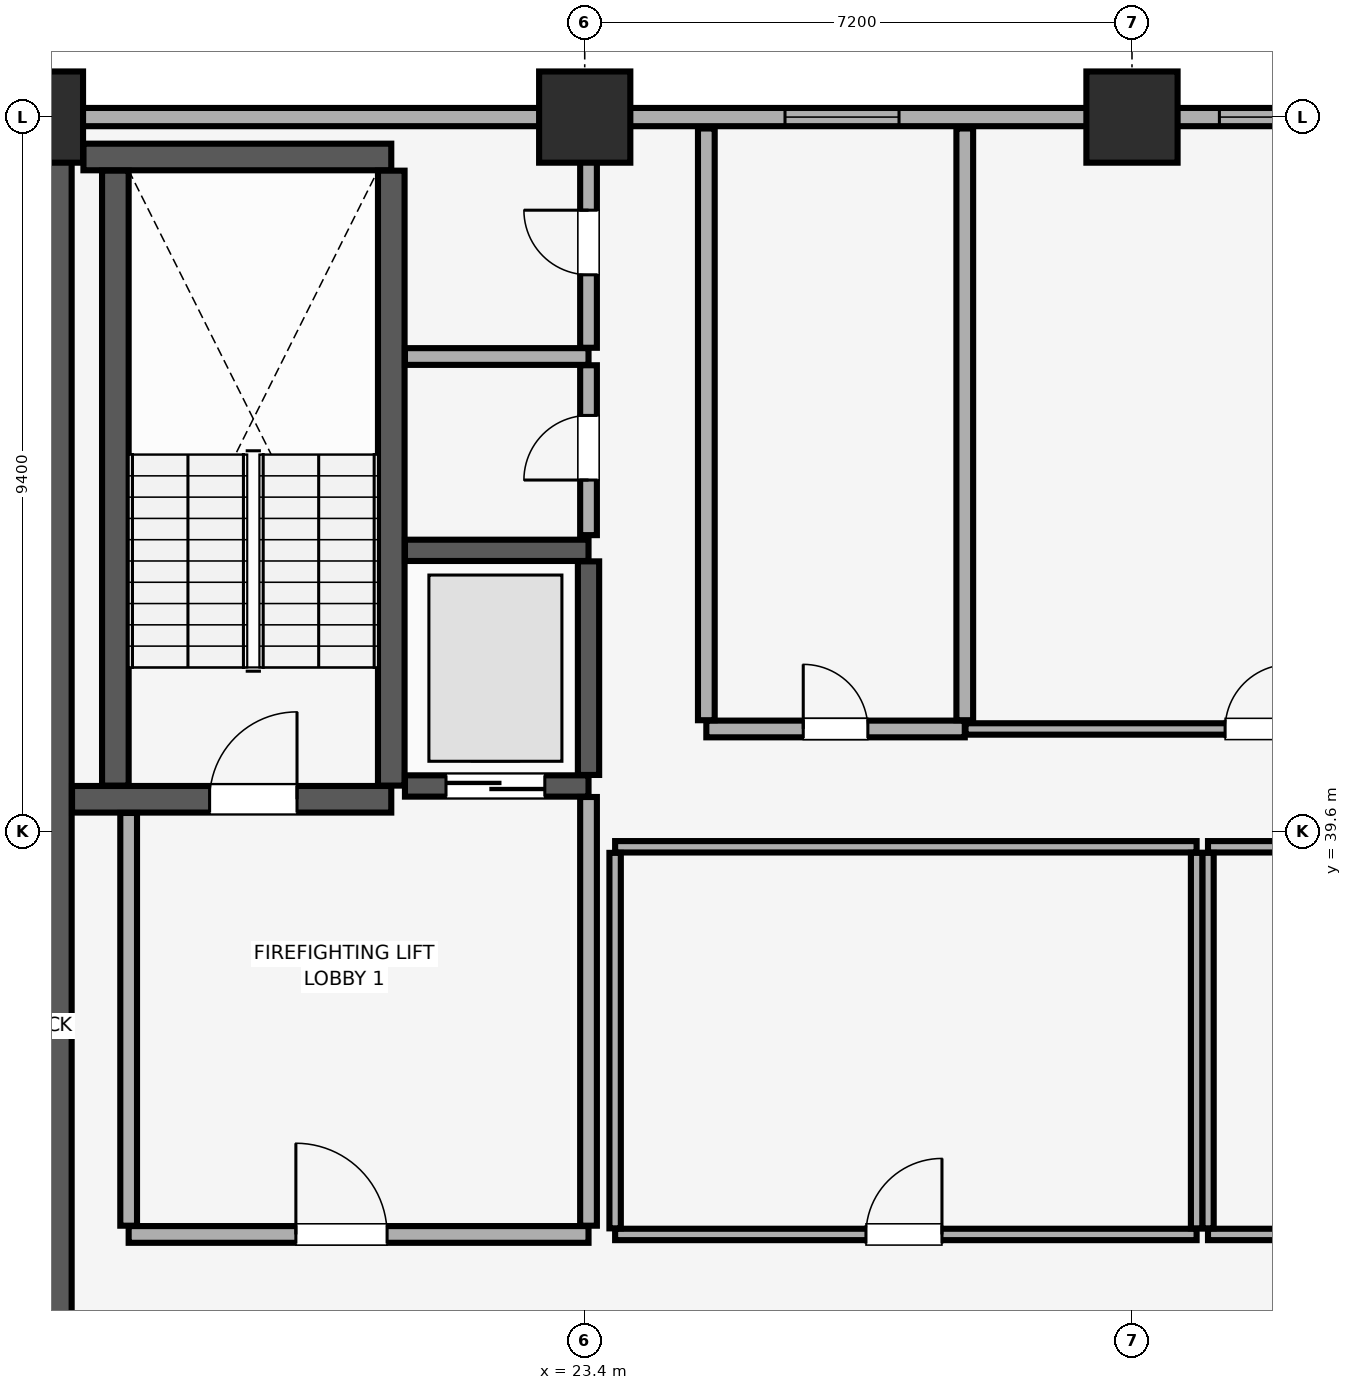
"""IFC4 building model, lengths in metres.
Left out: names, types, materials, properties, quantities, classifications, styles, units other than length and angle.
Written with IfcOpenShell. Run it as: python <this file> out.ifc"""

import sys

from ifc_helpers import new_model, si_unit, direction, frame, frame_2d, origin, origin_2d, place, context, subcontext, project, spatial, rectangle, extrude, element, fill, save


model = new_model("IFC4")
c1 = context("Model", 3, precision=1e-05, world=origin(), true_north=direction((0.0, 1.0)))
c2 = subcontext(c1, "Body", "Model", "MODEL_VIEW")
j1 = project(units=[si_unit("LENGTHUNIT", "METRE"), si_unit("PLANEANGLEUNIT", "RADIAN")], contexts=[c1])
p1 = place(None, origin())
s1 = spatial("IfcSite", under=j1, at=p1, CompositionType="ELEMENT")
p2 = place(p1, origin())
s2 = spatial("IfcBuilding", under=s1, at=p2, CompositionType="ELEMENT")
p3 = place(p2, frame((0.0, 0.0, 220.55)))
s3 = spatial("IfcBuildingStorey", under=s2, at=p3, CompositionType="ELEMENT", Elevation=220.55)
for number, where, z_axis, x_axis in (
    (1, (16.2, 49.0, 0.0), (0.0, 0.0, 1.0), (1.0, 0.0, 0.0)),
    (2, (23.4, 49.0, 0.0), (0.0, 0.0, 1.0), (1.0, 0.0, 0.0)),
    (3, (30.6, 49.0, 0.0), (0.0, 0.0, 1.0), (1.0, 0.0, 0.0)),
):
    element("IfcColumn", number, at=place(p3, frame(where, z_axis=z_axis, x_axis=x_axis)), inside=s3, PredefinedType="COLUMN", context=c2, shape_type="SweptSolid", body=[
        extrude(rectangle(XDim=1.2, YDim=1.2, at=origin_2d()), origin(), (0.0, 0.0, 1.0), 3.56),
    ])
p4 = place(p3, frame((77.0, 49.0, 0.0), z_axis=(0.0, 0.0, 1.0), x_axis=(-1.0, 0.0, 0.0)))
e4 = element("IfcWall", 4, at=p4, inside=s3, PredefinedType="SOLIDWALL", context=c2, shape_type="SweptSolid", body=[
    extrude(rectangle(XDim=70.0, YDim=0.24, at=frame_2d((35.0, 0.0))), origin(), (0.0, 0.0, 1.0), 2.76),
])
p5 = place(p4, frame((63.7, 0.0, 0.85)))
e5 = element("IfcOpeningElement", 5, at=p5, cuts=e4, PredefinedType="OPENING", context=c2, shape_type="SweptSolid", body=[
    extrude(rectangle(XDim=3.0, YDim=1.5, at=frame_2d((1.5, 0.75))), frame((0.0, 0.13, 0.0), z_axis=(0.0, -1.0, 0.0), x_axis=(1.0, 0.0, 0.0)), (0.0, 0.0, 1.0), 0.26),
])
p6 = place(p4, frame((3.3, 0.0, 0.85)))
e6 = element("IfcOpeningElement", 6, at=p6, cuts=e4, PredefinedType="OPENING", context=c2, shape_type="SweptSolid", body=[
    extrude(rectangle(XDim=3.0, YDim=1.5, at=frame_2d((1.5, 0.75))), frame((0.0, 0.13, 0.0), z_axis=(0.0, -1.0, 0.0), x_axis=(1.0, 0.0, 0.0)), (0.0, 0.0, 1.0), 0.26),
])
p7 = place(p4, frame((49.465, 0.0, 0.9)))
e7 = element("IfcOpeningElement", 7, at=p7, cuts=e4, PredefinedType="OPENING", context=c2, shape_type="SweptSolid", body=[
    extrude(rectangle(XDim=1.5, YDim=1.4, at=frame_2d((0.75, 0.7))), frame((0.0, 0.13, 0.0), z_axis=(0.0, -1.0, 0.0), x_axis=(1.0, 0.0, 0.0)), (0.0, 0.0, 1.0), 0.26),
])
p8 = place(p4, frame((41.65, 0.0, 0.9)))
e8 = element("IfcOpeningElement", 8, at=p8, cuts=e4, PredefinedType="OPENING", context=c2, shape_type="SweptSolid", body=[
    extrude(rectangle(XDim=3.6, YDim=1.5, at=frame_2d((1.8, 0.75))), frame((0.0, 0.13, 0.0), z_axis=(0.0, -1.0, 0.0), x_axis=(1.0, 0.0, 0.0)), (0.0, 0.0, 1.0), 0.26),
])
p9 = place(p4, frame((28.25, 0.0, 0.9)))
e9 = element("IfcOpeningElement", 9, at=p9, cuts=e4, PredefinedType="OPENING", context=c2, shape_type="SweptSolid", body=[
    extrude(rectangle(XDim=1.5, YDim=1.4, at=frame_2d((0.75, 0.7))), frame((0.0, 0.13, 0.0), z_axis=(0.0, -1.0, 0.0), x_axis=(1.0, 0.0, 0.0)), (0.0, 0.0, 1.0), 0.26),
])
p10 = place(p4, frame((24.6, 0.0, 0.9)))
e10 = element("IfcOpeningElement", 10, at=p10, cuts=e4, PredefinedType="OPENING", context=c2, shape_type="SweptSolid", body=[
    extrude(rectangle(XDim=2.4, YDim=1.5, at=frame_2d((1.2, 0.75))), frame((0.0, 0.13, 0.0), z_axis=(0.0, -1.0, 0.0), x_axis=(1.0, 0.0, 0.0)), (0.0, 0.0, 1.0), 0.26),
])
p11 = place(p4, frame((20.235, 0.0, 0.9)))
e11 = element("IfcOpeningElement", 11, at=p11, cuts=e4, PredefinedType="OPENING", context=c2, shape_type="SweptSolid", body=[
    extrude(rectangle(XDim=2.4, YDim=1.5, at=frame_2d((1.2, 0.75))), frame((0.0, 0.13, 0.0), z_axis=(0.0, -1.0, 0.0), x_axis=(1.0, 0.0, 0.0)), (0.0, 0.0, 1.0), 0.26),
])
p12 = place(p3, frame((16.2, 29.4, 0.0), z_axis=(0.0, 0.0, 1.0), x_axis=(0.0, 1.0, 0.0)))
e12 = element("IfcWall", 12, at=p12, inside=s3, PredefinedType="SHEAR", context=c2, shape_type="SweptSolid", body=[
    extrude(rectangle(XDim=19.2, YDim=0.9, at=frame_2d((9.6, 0.0))), origin(), (0.0, 0.0, 1.0), 3.56),
])
p13 = place(p3, frame((16.655, 40.025, 0.0), z_axis=(0.0, 0.0, 1.0), x_axis=(1.0, 0.0, 0.0)))
e13 = element("IfcWall", 13, at=p13, inside=s3, PredefinedType="SHEAR", context=c2, shape_type="SweptSolid", body=[
    extrude(rectangle(XDim=4.2, YDim=0.35, at=frame_2d((2.1, 0.0))), origin(), (0.0, 0.0, 1.0), 3.56),
])
p14 = place(p13, frame((1.81, 0.0, 0.0)))
e14 = element("IfcOpeningElement", 14, at=p14, cuts=e13, PredefinedType="OPENING", context=c2, shape_type="SweptSolid", body=[
    extrude(rectangle(XDim=1.15, YDim=2.15, at=frame_2d((0.575, 1.075))), frame((0.0, 0.185, 0.0), z_axis=(0.0, -1.0, 0.0), x_axis=(1.0, 0.0, 0.0)), (0.0, 0.0, 1.0), 0.37),
])
p15 = place(p3, frame((16.805, 48.475, 0.0), z_axis=(0.0, 0.0, 1.0), x_axis=(1.0, 0.0, 0.0)))
e15 = element("IfcWall", 15, at=p15, inside=s3, PredefinedType="SHEAR", context=c2, shape_type="SweptSolid", body=[
    extrude(rectangle(XDim=4.05, YDim=0.35, at=frame_2d((2.025, 0.0))), origin(), (0.0, 0.0, 1.0), 3.56),
])
for number, where, z_axis, x_axis in (
    (16, (17.225, 40.205, 0.0), (0.0, 0.0, 1.0), (0.0, 1.0, 0.0)),
    (17, (20.855, 40.205, 0.0), (0.0, 0.0, 1.0), (0.0, 1.0, 0.0)),
):
    element("IfcWall", number, at=place(p3, frame(where, z_axis=z_axis, x_axis=x_axis)), inside=s3, PredefinedType="SHEAR", context=c2, shape_type="SweptSolid", body=[
        extrude(rectangle(XDim=8.09, YDim=0.35, at=frame_2d((4.045, 0.0))), origin(), (0.0, 0.0, 1.0), 3.56),
    ])
p16 = place(p3, frame((21.035, 40.2, 0.0), z_axis=(0.0, 0.0, 1.0), x_axis=(1.0, 0.0, 0.0)))
e18 = element("IfcWall", 18, at=p16, inside=s3, PredefinedType="SHEAR", context=c2, shape_type="SweptSolid", body=[
    extrude(rectangle(XDim=2.415, YDim=0.28, at=frame_2d((1.208, 0.0))), origin(), (0.0, 0.0, 1.0), 3.56),
])
p17 = place(p16, frame((0.54, 0.0, 0.0)))
e19 = element("IfcOpeningElement", 19, at=p17, cuts=e18, PredefinedType="OPENING", context=c2, shape_type="SweptSolid", body=[
    extrude(rectangle(XDim=1.3, YDim=2.3, at=frame_2d((0.65, 1.15))), frame((0.0, 0.15, 0.0), z_axis=(0.0, -1.0, 0.0), x_axis=(1.0, 0.0, 0.0)), (0.0, 0.0, 1.0), 0.3),
])
p18 = place(p3, frame((21.035, 43.3, 0.0), z_axis=(0.0, 0.0, 1.0), x_axis=(1.0, 0.0, 0.0)))
e20 = element("IfcWall", 20, at=p18, inside=s3, PredefinedType="SHEAR", context=c2, shape_type="SweptSolid", body=[
    extrude(rectangle(XDim=2.415, YDim=0.28, at=frame_2d((1.208, 0.0))), origin(), (0.0, 0.0, 1.0), 3.56),
])
p19 = place(p3, frame((23.45, 40.345, 0.0), z_axis=(0.0, 0.0, 1.0), x_axis=(0.0, 1.0, 0.0)))
e21 = element("IfcWall", 21, at=p19, inside=s3, PredefinedType="SHEAR", context=c2, shape_type="SweptSolid", body=[
    extrude(rectangle(XDim=2.81, YDim=0.28, at=frame_2d((1.405, 0.0))), origin(), (0.0, 0.0, 1.0), 3.56),
])
p20 = place(p3, frame((17.4, 34.3, 0.0), z_axis=(0.0, 0.0, 1.0), x_axis=(1.0, 0.0, 0.0)))
e22 = element("IfcWall", 22, at=p20, inside=s3, PredefinedType="PARTITIONING", context=c2, shape_type="SweptSolid", body=[
    extrude(rectangle(XDim=6.05, YDim=0.22, at=frame_2d((3.025, 0.0))), origin(), (0.0, 0.0, 1.0), 3.56),
])
p21 = place(p20, frame((2.2, 0.0, 0.0)))
e23 = element("IfcOpeningElement", 23, at=p21, cuts=e22, PredefinedType="OPENING", context=c2, shape_type="SweptSolid", body=[
    extrude(rectangle(XDim=1.2, YDim=2.15, at=frame_2d((0.6, 1.075))), frame((0.0, 0.12, 0.0), z_axis=(0.0, -1.0, 0.0), x_axis=(1.0, 0.0, 0.0)), (0.0, 0.0, 1.0), 0.24),
])
p22 = place(p3, frame((17.4, 34.415, 0.0), z_axis=(0.0, 0.0, 1.0), x_axis=(0.0, 1.0, 0.0)))
e24 = element("IfcWall", 24, at=p22, inside=s3, PredefinedType="PARTITIONING", context=c2, shape_type="SweptSolid", body=[
    extrude(rectangle(XDim=5.43, YDim=0.22, at=frame_2d((2.715, 0.0))), origin(), (0.0, 0.0, 1.0), 3.56),
])
p23 = place(p3, frame((23.45, 34.415, 0.0), z_axis=(0.0, 0.0, 1.0), x_axis=(0.0, 1.0, 0.0)))
e25 = element("IfcWall", 25, at=p23, inside=s3, PredefinedType="PARTITIONING", context=c2, shape_type="SweptSolid", body=[
    extrude(rectangle(XDim=5.64, YDim=0.22, at=frame_2d((2.82, 0.0))), origin(), (0.0, 0.0, 1.0), 3.56),
])
p24 = place(p3, frame((21.035, 45.85, 0.0), z_axis=(0.0, 0.0, 1.0), x_axis=(1.0, 0.0, 0.0)))
e26 = element("IfcWall", 26, at=p24, inside=s3, PredefinedType="PARTITIONING", context=c2, shape_type="SweptSolid", body=[
    extrude(rectangle(XDim=2.415, YDim=0.22, at=frame_2d((1.208, 0.0))), origin(), (0.0, 0.0, 1.0), 3.56),
])
p25 = place(p3, frame((23.45, 43.5, 0.0), z_axis=(0.0, 0.0, 1.0), x_axis=(0.0, 1.0, 0.0)))
e27 = element("IfcWall", 27, at=p25, inside=s3, PredefinedType="PARTITIONING", context=c2, shape_type="SweptSolid", body=[
    extrude(rectangle(XDim=2.235, YDim=0.22, at=frame_2d((1.118, 0.0))), origin(), (0.0, 0.0, 1.0), 3.56),
])
p26 = place(p25, frame((0.725, 0.0, 0.0)))
e28 = element("IfcOpeningElement", 28, at=p26, cuts=e27, PredefinedType="OPENING", context=c2, shape_type="SweptSolid", body=[
    extrude(rectangle(XDim=0.85, YDim=2.1, at=frame_2d((0.425, 1.05))), frame((0.0, 0.12, 0.0), z_axis=(0.0, -1.0, 0.0), x_axis=(1.0, 0.0, 0.0)), (0.0, 0.0, 1.0), 0.24),
])
p27 = place(p3, frame((23.45, 45.965, 0.0), z_axis=(0.0, 0.0, 1.0), x_axis=(0.0, 1.0, 0.0)))
e29 = element("IfcWall", 29, at=p27, inside=s3, PredefinedType="PARTITIONING", context=c2, shape_type="SweptSolid", body=[
    extrude(rectangle(XDim=2.885, YDim=0.22, at=frame_2d((1.442, 0.0))), origin(), (0.0, 0.0, 1.0), 3.56),
])
p28 = place(p27, frame((0.96, 0.0, 0.0)))
e30 = element("IfcOpeningElement", 30, at=p28, cuts=e29, PredefinedType="OPENING", context=c2, shape_type="SweptSolid", body=[
    extrude(rectangle(XDim=0.85, YDim=2.1, at=frame_2d((0.425, 1.05))), frame((0.0, 0.12, 0.0), z_axis=(0.0, -1.0, 0.0), x_axis=(1.0, 0.0, 0.0)), (0.0, 0.0, 1.0), 0.24),
])
p29 = place(p3, frame((31.6, 34.3, 0.0), z_axis=(0.0, 0.0, 1.0), x_axis=(1.0, 0.0, 0.0)))
e31 = element("IfcWall", 31, at=p29, inside=s3, PredefinedType="PARTITIONING", context=c2, shape_type="SweptSolid", body=[
    extrude(rectangle(XDim=5.2, YDim=0.15, at=frame_2d((2.6, 0.0))), origin(), (0.0, 0.0, 1.0), 3.56),
])
p30 = place(p29, frame((2.175, 0.0, 0.0)))
e32 = element("IfcOpeningElement", 32, at=p30, cuts=e31, PredefinedType="OPENING", context=c2, shape_type="SweptSolid", body=[
    extrude(rectangle(XDim=0.85, YDim=2.1, at=frame_2d((0.425, 1.05))), frame((0.0, 0.085, 0.0), z_axis=(0.0, -1.0, 0.0), x_axis=(1.0, 0.0, 0.0)), (0.0, 0.0, 1.0), 0.17),
])
p31 = place(p3, frame((31.6, 39.4, 0.0), z_axis=(0.0, 0.0, 1.0), x_axis=(1.0, 0.0, 0.0)))
e33 = element("IfcWall", 33, at=p31, inside=s3, PredefinedType="PARTITIONING", context=c2, shape_type="SweptSolid", body=[
    extrude(rectangle(XDim=5.2, YDim=0.15, at=frame_2d((2.6, 0.0))), origin(), (0.0, 0.0, 1.0), 3.56),
])
p32 = place(p3, frame((31.6, 34.38, 0.0), z_axis=(0.0, 0.0, 1.0), x_axis=(0.0, 1.0, 0.0)))
e34 = element("IfcWall", 34, at=p32, inside=s3, PredefinedType="PARTITIONING", context=c2, shape_type="SweptSolid", body=[
    extrude(rectangle(XDim=4.94, YDim=0.15, at=frame_2d((2.47, 0.0))), origin(), (0.0, 0.0, 1.0), 3.56),
])
p33 = place(p3, frame((23.8, 34.3, 0.0), z_axis=(0.0, 0.0, 1.0), x_axis=(1.0, 0.0, 0.0)))
e35 = element("IfcWall", 35, at=p33, inside=s3, PredefinedType="PARTITIONING", context=c2, shape_type="SweptSolid", body=[
    extrude(rectangle(XDim=7.65, YDim=0.15, at=frame_2d((3.825, 0.0))), origin(), (0.0, 0.0, 1.0), 3.56),
])
p34 = place(p33, frame((3.3, 0.0, 0.0)))
e36 = element("IfcOpeningElement", 36, at=p34, cuts=e35, PredefinedType="OPENING", context=c2, shape_type="SweptSolid", body=[
    extrude(rectangle(XDim=1.0, YDim=2.15, at=frame_2d((0.5, 1.075))), frame((0.0, 0.085, 0.0), z_axis=(0.0, -1.0, 0.0), x_axis=(1.0, 0.0, 0.0)), (0.0, 0.0, 1.0), 0.17),
])
p35 = place(p3, frame((23.8, 39.4, 0.0), z_axis=(0.0, 0.0, 1.0), x_axis=(1.0, 0.0, 0.0)))
e37 = element("IfcWall", 37, at=p35, inside=s3, PredefinedType="PARTITIONING", context=c2, shape_type="SweptSolid", body=[
    extrude(rectangle(XDim=7.65, YDim=0.15, at=frame_2d((3.825, 0.0))), origin(), (0.0, 0.0, 1.0), 3.56),
])
for number, where, z_axis, x_axis in (
    (38, (23.8, 34.38, 0.0), (0.0, 0.0, 1.0), (0.0, 1.0, 0.0)),
    (39, (31.45, 34.38, 0.0), (0.0, 0.0, 1.0), (0.0, 1.0, 0.0)),
):
    element("IfcWall", number, at=place(p3, frame(where, z_axis=z_axis, x_axis=x_axis)), inside=s3, PredefinedType="PARTITIONING", context=c2, shape_type="SweptSolid", body=[
        extrude(rectangle(XDim=4.94, YDim=0.15, at=frame_2d((2.47, 0.0))), origin(), (0.0, 0.0, 1.0), 3.56),
    ])
p36 = place(p3, frame((25.0, 40.95, 0.0), z_axis=(0.0, 0.0, 1.0), x_axis=(1.0, 0.0, 0.0)))
e40 = element("IfcWall", 40, at=p36, inside=s3, PredefinedType="PARTITIONING", context=c2, shape_type="SweptSolid", body=[
    extrude(rectangle(XDim=3.4, YDim=0.22, at=frame_2d((1.7, 0.0))), origin(), (0.0, 0.0, 1.0), 3.56),
])
p37 = place(p36, frame((1.275, 0.0, 0.0)))
e41 = element("IfcOpeningElement", 41, at=p37, cuts=e40, PredefinedType="OPENING", context=c2, shape_type="SweptSolid", body=[
    extrude(rectangle(XDim=0.85, YDim=2.1, at=frame_2d((0.425, 1.05))), frame((0.0, 0.12, 0.0), z_axis=(0.0, -1.0, 0.0), x_axis=(1.0, 0.0, 0.0)), (0.0, 0.0, 1.0), 0.24),
])
for number, where, z_axis, x_axis in (
    (42, (25.0, 41.065, 0.0), (0.0, 0.0, 1.0), (0.0, 1.0, 0.0)),
    (43, (28.4, 41.065, 0.0), (0.0, 0.0, 1.0), (0.0, 1.0, 0.0)),
):
    element("IfcWall", number, at=place(p3, frame(where, z_axis=z_axis, x_axis=x_axis)), inside=s3, PredefinedType="PARTITIONING", context=c2, shape_type="SweptSolid", body=[
        extrude(rectangle(XDim=7.785, YDim=0.22, at=frame_2d((3.893, 0.0))), origin(), (0.0, 0.0, 1.0), 3.56),
    ])
p38 = place(p3, frame((28.41, 40.95, 0.0), z_axis=(0.0, 0.0, 1.0), x_axis=(1.0, 0.0, 0.0)))
e44 = element("IfcWall", 44, at=p38, inside=s3, PredefinedType="PARTITIONING", context=c2, shape_type="SweptSolid", body=[
    extrude(rectangle(XDim=7.69, YDim=0.15, at=frame_2d((3.845, 0.0))), origin(), (0.0, 0.0, 1.0), 3.56),
])
p39 = place(p38, frame((3.415, 0.0, 0.0)))
e45 = element("IfcOpeningElement", 45, at=p39, cuts=e44, PredefinedType="OPENING", context=c2, shape_type="SweptSolid", body=[
    extrude(rectangle(XDim=0.85, YDim=2.1, at=frame_2d((0.425, 1.05))), frame((0.0, 0.085, 0.0), z_axis=(0.0, -1.0, 0.0), x_axis=(1.0, 0.0, 0.0)), (0.0, 0.0, 1.0), 0.17),
])
p40 = place(p7, origin())
e46 = element("IfcWindow", 46, at=p40, inside=s3, PartitioningType="SINGLE_PANEL", PredefinedType="WINDOW", context=c2, shape_type="SweptSolid", body=[
    extrude(rectangle(XDim=1.5, YDim=1.4, at=frame_2d((0.75, 0.7))), frame((0.0, 0.03, 0.0), z_axis=(0.0, -1.0, 0.0), x_axis=(1.0, 0.0, 0.0)), (0.0, 0.0, 1.0), 0.06),
])
fill(e7, e46)
p41 = place(p8, origin())
e47 = element("IfcWindow", 47, at=p41, inside=s3, PartitioningType="SINGLE_PANEL", PredefinedType="WINDOW", context=c2, shape_type="SweptSolid", body=[
    extrude(rectangle(XDim=3.6, YDim=1.5, at=frame_2d((1.8, 0.75))), frame((0.0, 0.03, 0.0), z_axis=(0.0, -1.0, 0.0), x_axis=(1.0, 0.0, 0.0)), (0.0, 0.0, 1.0), 0.06),
])
fill(e8, e47)
p42 = place(p14, origin())
e48 = element("IfcDoor", 48, at=p42, inside=s3, OperationType="SINGLE_SWING_RIGHT", PredefinedType="DOOR", context=c2, shape_type="SweptSolid", body=[
    extrude(rectangle(XDim=1.15, YDim=2.15, at=frame_2d((0.575, 1.075))), frame((0.0, 0.025, 0.0), z_axis=(0.0, -1.0, 0.0), x_axis=(1.0, 0.0, 0.0)), (0.0, 0.0, 1.0), 0.05),
])
fill(e14, e48)
p43 = place(p17, origin())
e49 = element("IfcDoor", 49, at=p43, inside=s3, OperationType="DOUBLE_DOOR_SLIDING", PredefinedType="DOOR", context=c2, shape_type="SweptSolid", body=[
    extrude(rectangle(XDim=1.3, YDim=2.3, at=frame_2d((0.65, 1.15))), frame((0.0, 0.025, 0.0), z_axis=(0.0, -1.0, 0.0), x_axis=(1.0, 0.0, 0.0)), (0.0, 0.0, 1.0), 0.05),
])
fill(e19, e49)
p44 = place(p21, origin())
e50 = element("IfcDoor", 50, at=p44, inside=s3, OperationType="SINGLE_SWING_LEFT", PredefinedType="DOOR", context=c2, shape_type="SweptSolid", body=[
    extrude(rectangle(XDim=1.2, YDim=2.15, at=frame_2d((0.6, 1.075))), frame((0.0, 0.025, 0.0), z_axis=(0.0, -1.0, 0.0), x_axis=(1.0, 0.0, 0.0)), (0.0, 0.0, 1.0), 0.05),
])
fill(e23, e50)
p45 = place(p26, origin())
e51 = element("IfcDoor", 51, at=p45, inside=s3, OperationType="SINGLE_SWING_LEFT", PredefinedType="DOOR", context=c2, shape_type="SweptSolid", body=[
    extrude(rectangle(XDim=0.85, YDim=2.1, at=frame_2d((0.425, 1.05))), frame((0.0, 0.025, 0.0), z_axis=(0.0, -1.0, 0.0), x_axis=(1.0, 0.0, 0.0)), (0.0, 0.0, 1.0), 0.05),
])
fill(e28, e51)
p46 = place(p28, origin())
e52 = element("IfcDoor", 52, at=p46, inside=s3, OperationType="SINGLE_SWING_RIGHT", PredefinedType="DOOR", context=c2, shape_type="SweptSolid", body=[
    extrude(rectangle(XDim=0.85, YDim=2.1, at=frame_2d((0.425, 1.05))), frame((0.0, 0.025, 0.0), z_axis=(0.0, -1.0, 0.0), x_axis=(1.0, 0.0, 0.0)), (0.0, 0.0, 1.0), 0.05),
])
fill(e30, e52)
p47 = place(p34, origin())
e53 = element("IfcDoor", 53, at=p47, inside=s3, OperationType="SINGLE_SWING_RIGHT", PredefinedType="DOOR", context=c2, shape_type="SweptSolid", body=[
    extrude(rectangle(XDim=1.0, YDim=2.15, at=frame_2d((0.5, 1.075))), frame((0.0, 0.025, 0.0), z_axis=(0.0, -1.0, 0.0), x_axis=(1.0, 0.0, 0.0)), (0.0, 0.0, 1.0), 0.05),
])
fill(e36, e53)
p48 = place(p37, origin())
e54 = element("IfcDoor", 54, at=p48, inside=s3, OperationType="SINGLE_SWING_LEFT", PredefinedType="DOOR", context=c2, shape_type="SweptSolid", body=[
    extrude(rectangle(XDim=0.85, YDim=2.1, at=frame_2d((0.425, 1.05))), frame((0.0, 0.025, 0.0), z_axis=(0.0, -1.0, 0.0), x_axis=(1.0, 0.0, 0.0)), (0.0, 0.0, 1.0), 0.05),
])
fill(e41, e54)
p49 = place(p39, origin())
e55 = element("IfcDoor", 55, at=p49, inside=s3, OperationType="SINGLE_SWING_RIGHT", PredefinedType="DOOR", context=c2, shape_type="SweptSolid", body=[
    extrude(rectangle(XDim=0.85, YDim=2.1, at=frame_2d((0.425, 1.05))), frame((0.0, 0.025, 0.0), z_axis=(0.0, -1.0, 0.0), x_axis=(1.0, 0.0, 0.0)), (0.0, 0.0, 1.0), 0.05),
])
fill(e45, e55)
save(model, sys.argv[1])
